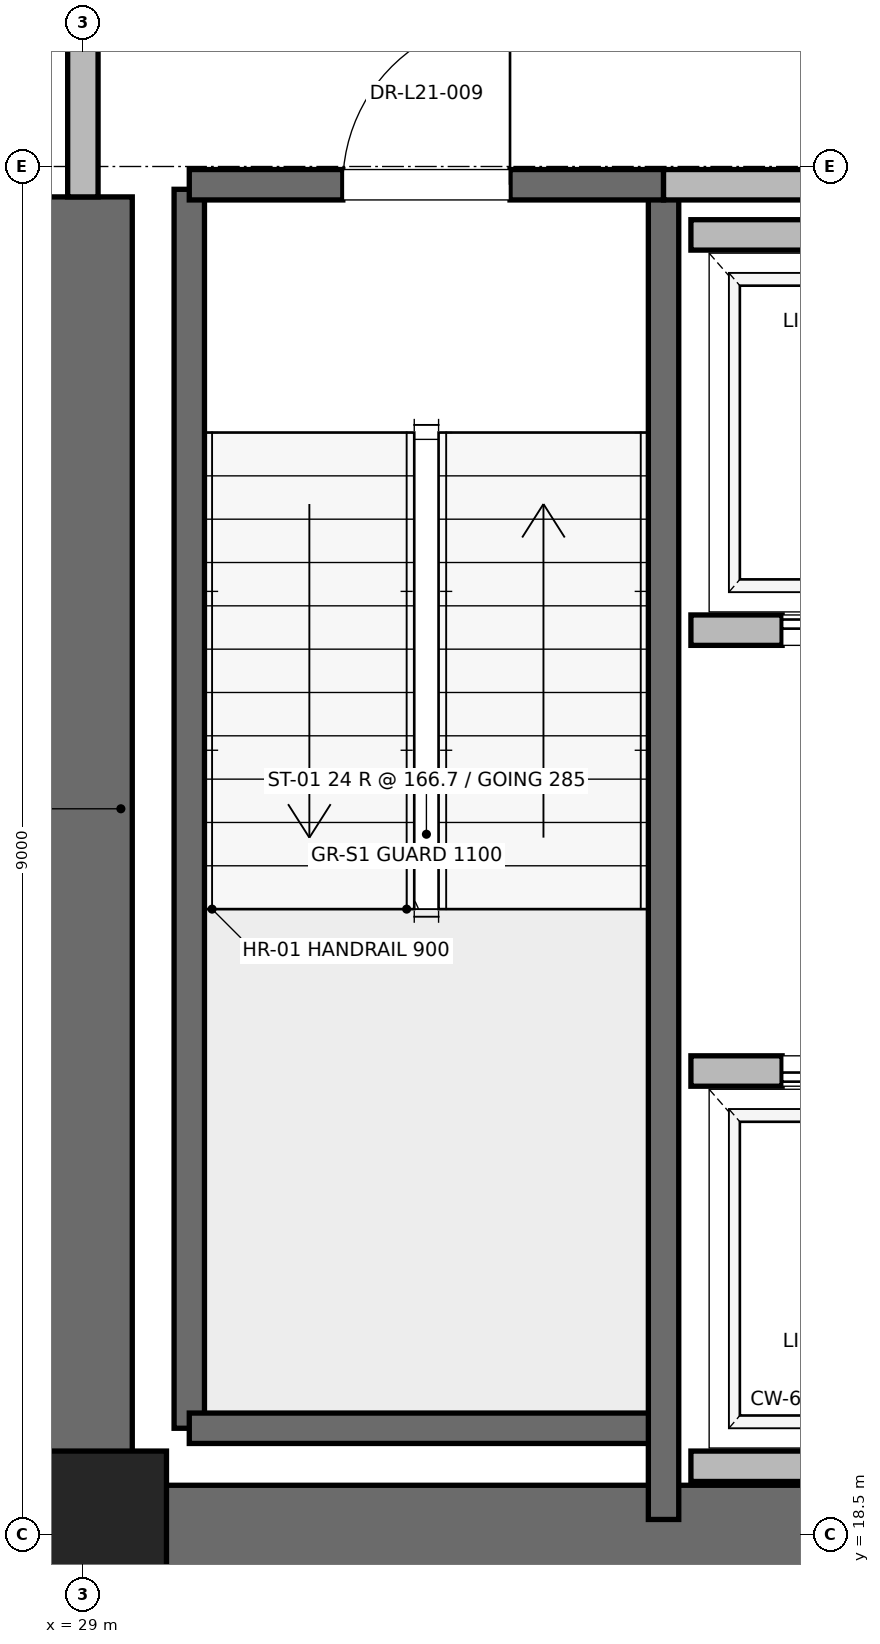
"""IFC4 building model, lengths in metres.
Left out: names, types, materials, properties, quantities, classifications, styles, units other than length and angle.
Written with IfcOpenShell. Run it as: python <this file> out.ifc"""

import sys

from ifc_helpers import new_model, si_unit, direction, frame, frame_2d, origin, origin_2d, place, context, subcontext, project, spatial, rectangle, extrude, element, fill, save


model = new_model("IFC4")
c1 = context("Model", 3, precision=1e-05, world=origin(), true_north=direction((0.0, 1.0)))
c2 = subcontext(c1, "Body", "Model", "MODEL_VIEW")
j1 = project(units=[si_unit("LENGTHUNIT", "METRE"), si_unit("PLANEANGLEUNIT", "RADIAN")], contexts=[c1])
p1 = place(None, origin())
s1 = spatial("IfcSite", under=j1, at=p1, CompositionType="ELEMENT")
p2 = place(p1, origin())
s2 = spatial("IfcBuilding", under=s1, at=p2, CompositionType="ELEMENT")
p3 = place(p2, frame((0.0, 0.0, 91.6)))
s3 = spatial("IfcBuildingStorey", under=s2, at=p3, CompositionType="ELEMENT", Elevation=91.6)
p4 = place(p3, frame((29.0, 18.5, 0.0), z_axis=(0.0, 0.0, 1.0), x_axis=(1.0, 0.0, 0.0)))
e1 = element("IfcColumn", 1, at=p4, inside=s3, PredefinedType="PILASTER", context=c2, shape_type="SweptSolid", body=[
    extrude(rectangle(XDim=1.1, YDim=1.1, at=origin_2d()), origin(), (0.0, 0.0, 1.0), 4.0),
])
p5 = place(p3, frame((29.0, 18.5, 0.0), z_axis=(0.0, 0.0, 1.0), x_axis=(1.0, 0.0, 0.0)))
e2 = element("IfcWall", 2, at=p5, inside=s3, PredefinedType="SHEAR", context=c2, shape_type="SweptSolid", body=[
    extrude(rectangle(XDim=9.2, YDim=0.65, at=frame_2d((4.6, 0.0))), origin(), (0.0, 0.0, 1.0), 3.76),
])
p6 = place(p3, frame((29.0, 18.5, 0.0), z_axis=(0.0, 0.0, 1.0), x_axis=(0.0, 1.0, 0.0)))
e3 = element("IfcWall", 3, at=p6, inside=s3, PredefinedType="SHEAR", context=c2, shape_type="SweptSolid", body=[
    extrude(rectangle(XDim=8.8, YDim=0.65, at=frame_2d((4.4, 0.0))), origin(), (0.0, 0.0, 1.0), 3.76),
])
p7 = place(p3, frame((29.7, 19.2, 0.0), z_axis=(0.0, 0.0, 1.0), x_axis=(0.0, 1.0, 0.0)))
e4 = element("IfcWall", 4, at=p7, inside=s3, PredefinedType="SOLIDWALL", context=c2, shape_type="SweptSolid", body=[
    extrude(rectangle(XDim=8.15, YDim=0.2, at=frame_2d((4.075, 0.0))), origin(), (0.0, 0.0, 1.0), 3.76),
])
p8 = place(p3, frame((29.7, 19.2, 0.0), z_axis=(0.0, 0.0, 1.0), x_axis=(1.0, 0.0, 0.0)))
e5 = element("IfcWall", 5, at=p8, inside=s3, PredefinedType="SOLIDWALL", context=c2, shape_type="SweptSolid", body=[
    extrude(rectangle(XDim=3.12, YDim=0.2, at=frame_2d((1.56, 0.0))), origin(), (0.0, 0.0, 1.0), 3.76),
])
p9 = place(p3, frame((32.82, 18.6, 0.0), z_axis=(0.0, 0.0, 1.0), x_axis=(0.0, 1.0, 0.0)))
e6 = element("IfcWall", 6, at=p9, inside=s3, PredefinedType="SOLIDWALL", context=c2, shape_type="SweptSolid", body=[
    extrude(rectangle(XDim=8.78, YDim=0.2, at=frame_2d((4.39, 0.0))), origin(), (0.0, 0.0, 1.0), 3.76),
])
p10 = place(p3, frame((29.7, 27.38, 0.0), z_axis=(0.0, 0.0, 1.0), x_axis=(1.0, 0.0, 0.0)))
e7 = element("IfcWall", 7, at=p10, inside=s3, PredefinedType="SOLIDWALL", context=c2, shape_type="SweptSolid", body=[
    extrude(rectangle(XDim=3.12, YDim=0.2, at=frame_2d((1.56, 0.0))), origin(), (0.0, 0.0, 1.0), 3.76),
])
p11 = place(p10, frame((1.01, 0.0, 0.0)))
e8 = element("IfcOpeningElement", 8, at=p11, cuts=e7, PredefinedType="OPENING", context=c2, shape_type="SweptSolid", body=[
    extrude(rectangle(XDim=1.1, YDim=2.15, at=frame_2d((0.55, 1.075))), frame((0.0, 0.1, 0.0), z_axis=(0.0, -1.0, 0.0), x_axis=(1.0, 0.0, 0.0)), (0.0, 0.0, 1.0), 0.2),
])
p12 = place(p3, frame((29.0, 27.3, 0.0), z_axis=(0.0, 0.0, 1.0), x_axis=(0.0, 1.0, 0.0)))
e9 = element("IfcWall", 9, at=p12, inside=s3, PredefinedType="PARTITIONING", context=c2, shape_type="SweptSolid", body=[
    extrude(rectangle(XDim=3.4, YDim=0.2, at=frame_2d((1.7, 0.0))), origin(), (0.0, 0.0, 1.0), 2.54),
])
p13 = place(p12, frame((1.125, 0.0, 0.0)))
e10 = element("IfcOpeningElement", 10, at=p13, cuts=e9, PredefinedType="OPENING", context=c2, shape_type="SweptSolid", body=[
    extrude(rectangle(XDim=1.15, YDim=2.2, at=frame_2d((0.575, 1.1))), frame((0.0, 0.1, 0.0), z_axis=(0.0, -1.0, 0.0), x_axis=(1.0, 0.0, 0.0)), (0.0, 0.0, 1.0), 0.2),
])
p14 = place(p3, frame((32.82, 27.38, 0.0), z_axis=(0.0, 0.0, 1.0), x_axis=(1.0, 0.0, 0.0)))
e11 = element("IfcWall", 11, at=p14, inside=s3, PredefinedType="PARTITIONING", context=c2, shape_type="SweptSolid", body=[
    extrude(rectangle(XDim=5.62, YDim=0.2, at=frame_2d((2.81, 0.0))), origin(), (0.0, 0.0, 1.0), 3.76),
])
p15 = place(p3, frame((33.0, 18.95, 0.0), z_axis=(0.0, 0.0, 1.0), x_axis=(1.0, 0.0, 0.0)))
e12 = element("IfcWall", 12, at=p15, inside=s3, PredefinedType="SOLIDWALL", context=c2, shape_type="SweptSolid", body=[
    extrude(rectangle(XDim=2.3, YDim=0.2, at=frame_2d((1.15, 0.0))), origin(), (0.0, 0.0, 1.0), 3.76),
])
p16 = place(p3, frame((35.3, 21.55, 0.0), z_axis=(0.0, 0.0, 1.0), x_axis=(-1.0, 0.0, 0.0)))
e13 = element("IfcWall", 13, at=p16, inside=s3, PredefinedType="SOLIDWALL", context=c2, shape_type="SweptSolid", body=[
    extrude(rectangle(XDim=2.3, YDim=0.2, at=frame_2d((1.15, 0.0))), origin(), (0.0, 0.0, 1.0), 3.76),
])
p17 = place(p16, frame((0.6, 0.0, 0.0)))
e14 = element("IfcOpeningElement", 14, at=p17, cuts=e13, PredefinedType="OPENING", context=c2, shape_type="SweptSolid", body=[
    extrude(rectangle(XDim=1.1, YDim=2.2, at=frame_2d((0.55, 1.1))), frame((0.0, 0.1, 0.0), z_axis=(0.0, -1.0, 0.0), x_axis=(1.0, 0.0, 0.0)), (0.0, 0.0, 1.0), 0.2),
])
p18 = place(p3, frame((33.0, 24.45, 0.0), z_axis=(0.0, 0.0, 1.0), x_axis=(1.0, 0.0, 0.0)))
e15 = element("IfcWall", 15, at=p18, inside=s3, PredefinedType="SOLIDWALL", context=c2, shape_type="SweptSolid", body=[
    extrude(rectangle(XDim=2.3, YDim=0.2, at=frame_2d((1.15, 0.0))), origin(), (0.0, 0.0, 1.0), 3.76),
])
p19 = place(p18, frame((0.6, 0.0, 0.0)))
e16 = element("IfcOpeningElement", 16, at=p19, cuts=e15, PredefinedType="OPENING", context=c2, shape_type="SweptSolid", body=[
    extrude(rectangle(XDim=1.1, YDim=2.2, at=frame_2d((0.55, 1.1))), frame((0.0, 0.1, 0.0), z_axis=(0.0, -1.0, 0.0), x_axis=(1.0, 0.0, 0.0)), (0.0, 0.0, 1.0), 0.2),
])
p20 = place(p3, frame((35.3, 27.05, 0.0), z_axis=(0.0, 0.0, 1.0), x_axis=(-1.0, 0.0, 0.0)))
e17 = element("IfcWall", 17, at=p20, inside=s3, PredefinedType="SOLIDWALL", context=c2, shape_type="SweptSolid", body=[
    extrude(rectangle(XDim=2.3, YDim=0.2, at=frame_2d((1.15, 0.0))), origin(), (0.0, 0.0, 1.0), 3.76),
])
p21 = place(p11, origin())
e18 = element("IfcDoor", 18, at=p21, inside=s3, OperationType="SINGLE_SWING_RIGHT", PredefinedType="DOOR", context=c2, shape_type="SweptSolid", body=[
    extrude(rectangle(XDim=1.1, YDim=2.15, at=frame_2d((0.55, 1.075))), frame((0.0, 0.025, 0.0), z_axis=(0.0, -1.0, 0.0), x_axis=(1.0, 0.0, 0.0)), (0.0, 0.0, 1.0), 0.05),
])
fill(e8, e18)
p22 = place(p17, origin())
e19 = element("IfcDoor", 19, at=p22, inside=s3, OperationType="SLIDING_TO_RIGHT", PredefinedType="DOOR", context=c2, shape_type="SweptSolid", body=[
    extrude(rectangle(XDim=1.1, YDim=2.2, at=frame_2d((0.55, 1.1))), frame((0.0, 0.025, 0.0), z_axis=(0.0, -1.0, 0.0), x_axis=(1.0, 0.0, 0.0)), (0.0, 0.0, 1.0), 0.05),
])
fill(e14, e19)
p23 = place(p19, origin())
e20 = element("IfcDoor", 20, at=p23, inside=s3, OperationType="SLIDING_TO_RIGHT", PredefinedType="DOOR", context=c2, shape_type="SweptSolid", body=[
    extrude(rectangle(XDim=1.1, YDim=2.2, at=frame_2d((0.55, 1.1))), frame((0.0, 0.025, 0.0), z_axis=(0.0, -1.0, 0.0), x_axis=(1.0, 0.0, 0.0)), (0.0, 0.0, 1.0), 0.05),
])
fill(e16, e20)
save(model, sys.argv[1])
